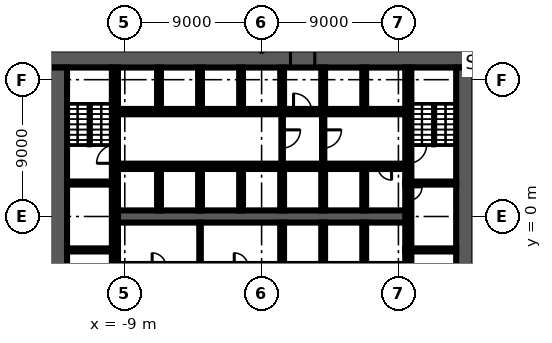
"""IFC4 building model, lengths in metres.
Left out: names, types, materials, properties, quantities, classifications, styles, units other than length and angle.
Written with IfcOpenShell. Run it as: python <this file> out.ifc"""

import sys

from ifc_helpers import new_model, si_unit, direction, frame, frame_2d, origin, place, context, subcontext, project, spatial, rectangle, extrude, element, fill, save


model = new_model("IFC4")
c1 = context("Model", 3, precision=1e-05, world=origin(), true_north=direction((0.0, 1.0)))
c2 = subcontext(c1, "Body", "Model", "MODEL_VIEW")
j1 = project(units=[si_unit("LENGTHUNIT", "METRE"), si_unit("PLANEANGLEUNIT", "RADIAN")], contexts=[c1])
p1 = place(None, origin())
s1 = spatial("IfcSite", under=j1, at=p1, CompositionType="ELEMENT")
p2 = place(p1, origin())
s2 = spatial("IfcBuilding", under=s1, at=p2, CompositionType="ELEMENT")
p3 = place(p2, frame((0.0, 0.0, -6.0)))
s3 = spatial("IfcBuildingStorey", under=s2, at=p3, CompositionType="ELEMENT", Elevation=-6.0)
p4 = place(p3, frame((-14.0, 10.4, 0.0), z_axis=(0.0, 0.0, 1.0), x_axis=(1.0, 0.0, 0.0)))
e1 = element("IfcWall", 1, at=p4, inside=s3, PredefinedType="SHEAR", context=c2, shape_type="SweptSolid", body=[
    extrude(rectangle(XDim=28.0, YDim=1.2, at=frame_2d((14.0, 0.0))), origin(), (0.0, 0.0, 1.0), 5.55),
])
p5 = place(p4, frame((15.9, 0.0, 0.0)))
e2 = element("IfcOpeningElement", 2, at=p5, cuts=e1, PredefinedType="OPENING", context=c2, shape_type="SweptSolid", body=[
    extrude(rectangle(XDim=1.6, YDim=2.1, at=frame_2d((0.8, 1.05))), frame((0.0, 0.61, 0.0), z_axis=(0.0, -1.0, 0.0), x_axis=(1.0, 0.0, 0.0)), (0.0, 0.0, 1.0), 1.22),
])
for number, where, z_axis, x_axis in (
    (3, (13.4, 9.8, 0.0), (0.0, 0.0, 1.0), (0.0, -1.0, 0.0)),
    (4, (-13.4, -9.8, 0.0), (0.0, 0.0, 1.0), (0.0, 1.0, 0.0)),
):
    element("IfcWall", number, at=place(p3, frame(where, z_axis=z_axis, x_axis=x_axis)), inside=s3, PredefinedType="SHEAR", context=c2, shape_type="SweptSolid", body=[
        extrude(rectangle(XDim=19.6, YDim=1.2, at=frame_2d((9.8, 0.0))), origin(), (0.0, 0.0, 1.0), 5.55),
    ])
p6 = place(p3, frame((9.65, -2.3, 0.0), z_axis=(0.0, 0.0, 1.0), x_axis=(0.0, -1.0, 0.0)))
e5 = element("IfcWall", 5, at=p6, inside=s3, PredefinedType="SHEAR", context=c2, shape_type="SweptSolid", body=[
    extrude(rectangle(XDim=7.5, YDim=0.4, at=frame_2d((3.75, 0.0))), origin(), (0.0, 0.0, 1.0), 5.55),
])
p7 = place(p6, frame((1.2, 0.0, 0.0)))
e6 = element("IfcOpeningElement", 6, at=p7, cuts=e5, PredefinedType="OPENING", context=c2, shape_type="SweptSolid", body=[
    extrude(rectangle(XDim=1.2, YDim=2.1, at=frame_2d((0.6, 1.05))), frame((0.0, 0.21, 0.0), z_axis=(0.0, -1.0, 0.0), x_axis=(1.0, 0.0, 0.0)), (0.0, 0.0, 1.0), 0.42),
])
p8 = place(p3, frame((9.65, 2.1, 0.0), z_axis=(0.0, 0.0, 1.0), x_axis=(0.0, -1.0, 0.0)))
e7 = element("IfcWall", 7, at=p8, inside=s3, PredefinedType="SHEAR", context=c2, shape_type="SweptSolid", body=[
    extrude(rectangle(XDim=4.2, YDim=0.4, at=frame_2d((2.1, 0.0))), origin(), (0.0, 0.0, 1.0), 5.55),
])
p9 = place(p8, frame((0.15, 0.0, 0.0)))
e8 = element("IfcOpeningElement", 8, at=p9, cuts=e7, PredefinedType="OPENING", context=c2, shape_type="SweptSolid", body=[
    extrude(rectangle(XDim=0.9, YDim=2.1, at=frame_2d((0.45, 1.05))), frame((0.0, 0.21, 0.0), z_axis=(0.0, -1.0, 0.0), x_axis=(1.0, 0.0, 0.0)), (0.0, 0.0, 1.0), 0.42),
])
p10 = place(p3, frame((9.65, 9.8, 0.0), z_axis=(0.0, 0.0, 1.0), x_axis=(0.0, -1.0, 0.0)))
e9 = element("IfcWall", 9, at=p10, inside=s3, PredefinedType="SHEAR", context=c2, shape_type="SweptSolid", body=[
    extrude(rectangle(XDim=7.5, YDim=0.4, at=frame_2d((3.75, 0.0))), origin(), (0.0, 0.0, 1.0), 5.55),
])
p11 = place(p10, frame((5.1, 0.0, 0.0)))
e10 = element("IfcOpeningElement", 10, at=p11, cuts=e9, PredefinedType="OPENING", context=c2, shape_type="SweptSolid", body=[
    extrude(rectangle(XDim=1.2, YDim=2.1, at=frame_2d((0.6, 1.05))), frame((0.0, 0.21, 0.0), z_axis=(0.0, -1.0, 0.0), x_axis=(1.0, 0.0, 0.0)), (0.0, 0.0, 1.0), 0.42),
])
p12 = place(p3, frame((-9.65, -9.8, 0.0), z_axis=(0.0, 0.0, 1.0), x_axis=(0.0, 1.0, 0.0)))
e11 = element("IfcWall", 11, at=p12, inside=s3, PredefinedType="SHEAR", context=c2, shape_type="SweptSolid", body=[
    extrude(rectangle(XDim=7.5, YDim=0.4, at=frame_2d((3.75, 0.0))), origin(), (0.0, 0.0, 1.0), 5.55),
])
p13 = place(p12, frame((5.1, 0.0, 0.0)))
e12 = element("IfcOpeningElement", 12, at=p13, cuts=e11, PredefinedType="OPENING", context=c2, shape_type="SweptSolid", body=[
    extrude(rectangle(XDim=1.2, YDim=2.1, at=frame_2d((0.6, 1.05))), frame((0.0, 0.21, 0.0), z_axis=(0.0, -1.0, 0.0), x_axis=(1.0, 0.0, 0.0)), (0.0, 0.0, 1.0), 0.42),
])
p14 = place(p3, frame((-9.65, -2.1, 0.0), z_axis=(0.0, 0.0, 1.0), x_axis=(0.0, 1.0, 0.0)))
e13 = element("IfcWall", 13, at=p14, inside=s3, PredefinedType="SHEAR", context=c2, shape_type="SweptSolid", body=[
    extrude(rectangle(XDim=4.2, YDim=0.4, at=frame_2d((2.1, 0.0))), origin(), (0.0, 0.0, 1.0), 5.55),
])
p15 = place(p3, frame((-9.65, 2.3, 0.0), z_axis=(0.0, 0.0, 1.0), x_axis=(0.0, 1.0, 0.0)))
e14 = element("IfcWall", 14, at=p15, inside=s3, PredefinedType="SHEAR", context=c2, shape_type="SweptSolid", body=[
    extrude(rectangle(XDim=7.5, YDim=0.4, at=frame_2d((3.75, 0.0))), origin(), (0.0, 0.0, 1.0), 5.55),
])
p16 = place(p15, frame((1.2, 0.0, 0.0)))
e15 = element("IfcOpeningElement", 15, at=p16, cuts=e14, PredefinedType="OPENING", context=c2, shape_type="SweptSolid", body=[
    extrude(rectangle(XDim=1.2, YDim=2.1, at=frame_2d((0.6, 1.05))), frame((0.0, 0.21, 0.0), z_axis=(0.0, -1.0, 0.0), x_axis=(1.0, 0.0, 0.0)), (0.0, 0.0, 1.0), 0.42),
])
for number, where, z_axis, x_axis in (
    (16, (9.45, 2.2, 0.0), (0.0, 0.0, 1.0), (1.0, 0.0, 0.0)),
    (17, (-9.45, 2.2, 0.0), (0.0, 0.0, 1.0), (-1.0, 0.0, 0.0)),
    (18, (9.45, -2.2, 0.0), (0.0, 0.0, 1.0), (1.0, 0.0, 0.0)),
    (19, (-9.45, -2.2, 0.0), (0.0, 0.0, 1.0), (-1.0, 0.0, 0.0)),
):
    element("IfcWall", number, at=place(p3, frame(where, z_axis=z_axis, x_axis=x_axis)), inside=s3, PredefinedType="SHEAR", context=c2, shape_type="SweptSolid", body=[
        extrude(rectangle(XDim=3.35, YDim=0.2, at=frame_2d((1.675, 0.0))), origin(), (0.0, 0.0, 1.0), 5.55),
    ])
p17 = place(p3, frame((-9.45, 6.9, 0.0), z_axis=(0.0, 0.0, 1.0), x_axis=(1.0, 0.0, 0.0)))
e20 = element("IfcWall", 20, at=p17, inside=s3, PredefinedType="SHEAR", context=c2, shape_type="SweptSolid", body=[
    extrude(rectangle(XDim=18.9, YDim=0.35, at=frame_2d((9.45, 0.0))), origin(), (0.0, 0.0, 1.0), 5.55),
])
p18 = place(p17, frame((0.8, 0.0, 0.0)))
e21 = element("IfcOpeningElement", 21, at=p18, cuts=e20, PredefinedType="OPENING", context=c2, shape_type="SweptSolid", body=[
    extrude(rectangle(XDim=1.1, YDim=2.1, at=frame_2d((0.55, 1.05))), frame((0.0, 0.185, 0.0), z_axis=(0.0, -1.0, 0.0), x_axis=(1.0, 0.0, 0.0)), (0.0, 0.0, 1.0), 0.37),
])
p19 = place(p17, frame((3.5, 0.0, 0.0)))
e22 = element("IfcOpeningElement", 22, at=p19, cuts=e20, PredefinedType="OPENING", context=c2, shape_type="SweptSolid", body=[
    extrude(rectangle(XDim=1.1, YDim=2.1, at=frame_2d((0.55, 1.05))), frame((0.0, 0.185, 0.0), z_axis=(0.0, -1.0, 0.0), x_axis=(1.0, 0.0, 0.0)), (0.0, 0.0, 1.0), 0.37),
])
p20 = place(p17, frame((6.2, 0.0, 0.0)))
e23 = element("IfcOpeningElement", 23, at=p20, cuts=e20, PredefinedType="OPENING", context=c2, shape_type="SweptSolid", body=[
    extrude(rectangle(XDim=1.1, YDim=2.1, at=frame_2d((0.55, 1.05))), frame((0.0, 0.185, 0.0), z_axis=(0.0, -1.0, 0.0), x_axis=(1.0, 0.0, 0.0)), (0.0, 0.0, 1.0), 0.37),
])
p21 = place(p17, frame((8.9, 0.0, 0.0)))
e24 = element("IfcOpeningElement", 24, at=p21, cuts=e20, PredefinedType="OPENING", context=c2, shape_type="SweptSolid", body=[
    extrude(rectangle(XDim=1.1, YDim=2.1, at=frame_2d((0.55, 1.05))), frame((0.0, 0.185, 0.0), z_axis=(0.0, -1.0, 0.0), x_axis=(1.0, 0.0, 0.0)), (0.0, 0.0, 1.0), 0.37),
])
p22 = place(p17, frame((11.55, 0.0, 0.0)))
e25 = element("IfcOpeningElement", 25, at=p22, cuts=e20, PredefinedType="OPENING", context=c2, shape_type="SweptSolid", body=[
    extrude(rectangle(XDim=1.2, YDim=2.1, at=frame_2d((0.6, 1.05))), frame((0.0, 0.185, 0.0), z_axis=(0.0, -1.0, 0.0), x_axis=(1.0, 0.0, 0.0)), (0.0, 0.0, 1.0), 0.37),
])
p23 = place(p17, frame((14.3, 0.0, 0.0)))
e26 = element("IfcOpeningElement", 26, at=p23, cuts=e20, PredefinedType="OPENING", context=c2, shape_type="SweptSolid", body=[
    extrude(rectangle(XDim=1.1, YDim=2.1, at=frame_2d((0.55, 1.05))), frame((0.0, 0.185, 0.0), z_axis=(0.0, -1.0, 0.0), x_axis=(1.0, 0.0, 0.0)), (0.0, 0.0, 1.0), 0.37),
])
p24 = place(p17, frame((17.0, 0.0, 0.0)))
e27 = element("IfcOpeningElement", 27, at=p24, cuts=e20, PredefinedType="OPENING", context=c2, shape_type="SweptSolid", body=[
    extrude(rectangle(XDim=1.1, YDim=2.1, at=frame_2d((0.55, 1.05))), frame((0.0, 0.185, 0.0), z_axis=(0.0, -1.0, 0.0), x_axis=(1.0, 0.0, 0.0)), (0.0, 0.0, 1.0), 0.37),
])
p25 = place(p3, frame((9.45, 3.3, 0.0), z_axis=(0.0, 0.0, 1.0), x_axis=(-1.0, 0.0, 0.0)))
e28 = element("IfcWall", 28, at=p25, inside=s3, PredefinedType="SHEAR", context=c2, shape_type="SweptSolid", body=[
    extrude(rectangle(XDim=18.9, YDim=0.35, at=frame_2d((9.45, 0.0))), origin(), (0.0, 0.0, 1.0), 5.55),
])
p26 = place(p25, frame((17.0, 0.0, 0.0)))
e29 = element("IfcOpeningElement", 29, at=p26, cuts=e28, PredefinedType="OPENING", context=c2, shape_type="SweptSolid", body=[
    extrude(rectangle(XDim=1.1, YDim=2.1, at=frame_2d((0.55, 1.05))), frame((0.0, 0.185, 0.0), z_axis=(0.0, -1.0, 0.0), x_axis=(1.0, 0.0, 0.0)), (0.0, 0.0, 1.0), 0.37),
])
p27 = place(p25, frame((14.3, 0.0, 0.0)))
e30 = element("IfcOpeningElement", 30, at=p27, cuts=e28, PredefinedType="OPENING", context=c2, shape_type="SweptSolid", body=[
    extrude(rectangle(XDim=1.1, YDim=2.1, at=frame_2d((0.55, 1.05))), frame((0.0, 0.185, 0.0), z_axis=(0.0, -1.0, 0.0), x_axis=(1.0, 0.0, 0.0)), (0.0, 0.0, 1.0), 0.37),
])
p28 = place(p25, frame((11.6, 0.0, 0.0)))
e31 = element("IfcOpeningElement", 31, at=p28, cuts=e28, PredefinedType="OPENING", context=c2, shape_type="SweptSolid", body=[
    extrude(rectangle(XDim=1.1, YDim=2.1, at=frame_2d((0.55, 1.05))), frame((0.0, 0.185, 0.0), z_axis=(0.0, -1.0, 0.0), x_axis=(1.0, 0.0, 0.0)), (0.0, 0.0, 1.0), 0.37),
])
p29 = place(p25, frame((8.9, 0.0, 0.0)))
e32 = element("IfcOpeningElement", 32, at=p29, cuts=e28, PredefinedType="OPENING", context=c2, shape_type="SweptSolid", body=[
    extrude(rectangle(XDim=1.1, YDim=2.1, at=frame_2d((0.55, 1.05))), frame((0.0, 0.185, 0.0), z_axis=(0.0, -1.0, 0.0), x_axis=(1.0, 0.0, 0.0)), (0.0, 0.0, 1.0), 0.37),
])
p30 = place(p25, frame((6.2, 0.0, 0.0)))
e33 = element("IfcOpeningElement", 33, at=p30, cuts=e28, PredefinedType="OPENING", context=c2, shape_type="SweptSolid", body=[
    extrude(rectangle(XDim=1.1, YDim=2.1, at=frame_2d((0.55, 1.05))), frame((0.0, 0.185, 0.0), z_axis=(0.0, -1.0, 0.0), x_axis=(1.0, 0.0, 0.0)), (0.0, 0.0, 1.0), 0.37),
])
p31 = place(p25, frame((3.5, 0.0, 0.0)))
e34 = element("IfcOpeningElement", 34, at=p31, cuts=e28, PredefinedType="OPENING", context=c2, shape_type="SweptSolid", body=[
    extrude(rectangle(XDim=1.1, YDim=2.1, at=frame_2d((0.55, 1.05))), frame((0.0, 0.185, 0.0), z_axis=(0.0, -1.0, 0.0), x_axis=(1.0, 0.0, 0.0)), (0.0, 0.0, 1.0), 0.37),
])
p32 = place(p25, frame((0.9, 0.0, 0.0)))
e35 = element("IfcOpeningElement", 35, at=p32, cuts=e28, PredefinedType="OPENING", context=c2, shape_type="SweptSolid", body=[
    extrude(rectangle(XDim=0.9, YDim=2.1, at=frame_2d((0.45, 1.05))), frame((0.0, 0.185, 0.0), z_axis=(0.0, -1.0, 0.0), x_axis=(1.0, 0.0, 0.0)), (0.0, 0.0, 1.0), 0.37),
])
p33 = place(p3, frame((-9.45, 0.0, 0.0), z_axis=(0.0, 0.0, 1.0), x_axis=(1.0, 0.0, 0.0)))
e36 = element("IfcWall", 36, at=p33, inside=s3, PredefinedType="SHEAR", context=c2, shape_type="SweptSolid", body=[
    extrude(rectangle(XDim=18.9, YDim=0.8, at=frame_2d((9.45, 0.0))), origin(), (0.0, 0.0, 1.0), 5.55),
])
for number, where, z_axis, x_axis in (
    (37, (6.75, -3.125, 0.0), (0.0, 0.0, 1.0), (0.0, 1.0, 0.0)),
    (38, (6.75, 0.4, 0.0), (0.0, 0.0, 1.0), (0.0, 1.0, 0.0)),
    (39, (6.75, 7.075, 0.0), (0.0, 0.0, 1.0), (0.0, 1.0, 0.0)),
):
    element("IfcWall", number, at=place(p3, frame(where, z_axis=z_axis, x_axis=x_axis)), inside=s3, PredefinedType="SOLIDWALL", context=c2, shape_type="SweptSolid", body=[
        extrude(rectangle(XDim=2.725, YDim=0.25, at=frame_2d((1.363, 0.0))), origin(), (0.0, 0.0, 1.0), 5.55),
    ])
p34 = place(p3, frame((4.05, 6.725, 0.0), z_axis=(0.0, 0.0, 1.0), x_axis=(0.0, -1.0, 0.0)))
e40 = element("IfcWall", 40, at=p34, inside=s3, PredefinedType="PARTITIONING", context=c2, shape_type="SweptSolid", body=[
    extrude(rectangle(XDim=3.25, YDim=0.15, at=frame_2d((1.625, 0.0))), origin(), (0.0, 0.0, 1.0), 5.55),
])
p35 = place(p34, frame((1.025, 0.0, 0.0)))
e41 = element("IfcOpeningElement", 41, at=p35, cuts=e40, PredefinedType="OPENING", context=c2, shape_type="SweptSolid", body=[
    extrude(rectangle(XDim=1.2, YDim=2.1, at=frame_2d((0.6, 1.05))), frame((0.0, 0.085, 0.0), z_axis=(0.0, -1.0, 0.0), x_axis=(1.0, 0.0, 0.0)), (0.0, 0.0, 1.0), 0.17),
])
for number, where, z_axis, x_axis in (
    (42, (4.05, -3.125, 0.0), (0.0, 0.0, 1.0), (0.0, 1.0, 0.0)),
    (43, (4.05, 0.4, 0.0), (0.0, 0.0, 1.0), (0.0, 1.0, 0.0)),
    (44, (4.05, 7.075, 0.0), (0.0, 0.0, 1.0), (0.0, 1.0, 0.0)),
):
    element("IfcWall", number, at=place(p3, frame(where, z_axis=z_axis, x_axis=x_axis)), inside=s3, PredefinedType="SOLIDWALL", context=c2, shape_type="SweptSolid", body=[
        extrude(rectangle(XDim=2.725, YDim=0.25, at=frame_2d((1.363, 0.0))), origin(), (0.0, 0.0, 1.0), 5.55),
    ])
p36 = place(p3, frame((1.35, 6.725, 0.0), z_axis=(0.0, 0.0, 1.0), x_axis=(0.0, -1.0, 0.0)))
e45 = element("IfcWall", 45, at=p36, inside=s3, PredefinedType="PARTITIONING", context=c2, shape_type="SweptSolid", body=[
    extrude(rectangle(XDim=3.25, YDim=0.1, at=frame_2d((1.625, 0.0))), origin(), (0.0, 0.0, 1.0), 5.55),
])
p37 = place(p36, frame((1.025, 0.0, 0.0)))
e46 = element("IfcOpeningElement", 46, at=p37, cuts=e45, PredefinedType="OPENING", context=c2, shape_type="SweptSolid", body=[
    extrude(rectangle(XDim=1.2, YDim=2.1, at=frame_2d((0.6, 1.05))), frame((0.0, 0.06, 0.0), z_axis=(0.0, -1.0, 0.0), x_axis=(1.0, 0.0, 0.0)), (0.0, 0.0, 1.0), 0.12),
])
for number, where, z_axis, x_axis in (
    (47, (1.35, -3.125, 0.0), (0.0, 0.0, 1.0), (0.0, 1.0, 0.0)),
    (48, (1.35, 0.4, 0.0), (0.0, 0.0, 1.0), (0.0, 1.0, 0.0)),
    (49, (1.35, 7.075, 0.0), (0.0, 0.0, 1.0), (0.0, 1.0, 0.0)),
    (50, (-1.35, 0.4, 0.0), (0.0, 0.0, 1.0), (0.0, 1.0, 0.0)),
    (51, (-1.35, 7.075, 0.0), (0.0, 0.0, 1.0), (0.0, 1.0, 0.0)),
):
    element("IfcWall", number, at=place(p3, frame(where, z_axis=z_axis, x_axis=x_axis)), inside=s3, PredefinedType="SOLIDWALL", context=c2, shape_type="SweptSolid", body=[
        extrude(rectangle(XDim=2.725, YDim=0.25, at=frame_2d((1.363, 0.0))), origin(), (0.0, 0.0, 1.0), 5.55),
    ])
p38 = place(p3, frame((-4.05, -3.125, 0.0), z_axis=(0.0, 0.0, 1.0), x_axis=(0.0, 1.0, 0.0)))
e52 = element("IfcWall", 52, at=p38, inside=s3, PredefinedType="PARTITIONING", context=c2, shape_type="SweptSolid", body=[
    extrude(rectangle(XDim=2.725, YDim=0.1, at=frame_2d((1.363, 0.0))), origin(), (0.0, 0.0, 1.0), 5.55),
])
for number, where, z_axis, x_axis in (
    (53, (-4.05, 0.4, 0.0), (0.0, 0.0, 1.0), (0.0, 1.0, 0.0)),
    (54, (-4.05, 7.075, 0.0), (0.0, 0.0, 1.0), (0.0, 1.0, 0.0)),
    (55, (-6.75, 0.4, 0.0), (0.0, 0.0, 1.0), (0.0, 1.0, 0.0)),
    (56, (-6.75, 7.075, 0.0), (0.0, 0.0, 1.0), (0.0, 1.0, 0.0)),
):
    element("IfcWall", number, at=place(p3, frame(where, z_axis=z_axis, x_axis=x_axis)), inside=s3, PredefinedType="SOLIDWALL", context=c2, shape_type="SweptSolid", body=[
        extrude(rectangle(XDim=2.725, YDim=0.25, at=frame_2d((1.363, 0.0))), origin(), (0.0, 0.0, 1.0), 5.55),
    ])
p39 = place(p9, origin())
e57 = element("IfcDoor", 57, at=p39, inside=s3, OperationType="SINGLE_SWING_RIGHT", PredefinedType="DOOR", context=c2, shape_type="SweptSolid", body=[
    extrude(rectangle(XDim=0.9, YDim=2.1, at=frame_2d((0.45, 1.05))), frame((0.0, 0.025, 0.0), z_axis=(0.0, -1.0, 0.0), x_axis=(1.0, 0.0, 0.0)), (0.0, 0.0, 1.0), 0.05),
])
fill(e8, e57)
p40 = place(p18, origin())
e58 = element("IfcDoor", 58, at=p40, inside=s3, OperationType="DOUBLE_DOOR_SLIDING", PredefinedType="DOOR", context=c2, shape_type="SweptSolid", body=[
    extrude(rectangle(XDim=1.1, YDim=2.1, at=frame_2d((0.55, 1.05))), frame((0.0, 0.025, 0.0), z_axis=(0.0, -1.0, 0.0), x_axis=(1.0, 0.0, 0.0)), (0.0, 0.0, 1.0), 0.05),
])
fill(e21, e58)
p41 = place(p19, origin())
e59 = element("IfcDoor", 59, at=p41, inside=s3, OperationType="DOUBLE_DOOR_SLIDING", PredefinedType="DOOR", context=c2, shape_type="SweptSolid", body=[
    extrude(rectangle(XDim=1.1, YDim=2.1, at=frame_2d((0.55, 1.05))), frame((0.0, 0.025, 0.0), z_axis=(0.0, -1.0, 0.0), x_axis=(1.0, 0.0, 0.0)), (0.0, 0.0, 1.0), 0.05),
])
fill(e22, e59)
p42 = place(p20, origin())
e60 = element("IfcDoor", 60, at=p42, inside=s3, OperationType="DOUBLE_DOOR_SLIDING", PredefinedType="DOOR", context=c2, shape_type="SweptSolid", body=[
    extrude(rectangle(XDim=1.1, YDim=2.1, at=frame_2d((0.55, 1.05))), frame((0.0, 0.025, 0.0), z_axis=(0.0, -1.0, 0.0), x_axis=(1.0, 0.0, 0.0)), (0.0, 0.0, 1.0), 0.05),
])
fill(e23, e60)
p43 = place(p21, origin())
e61 = element("IfcDoor", 61, at=p43, inside=s3, OperationType="DOUBLE_DOOR_SLIDING", PredefinedType="DOOR", context=c2, shape_type="SweptSolid", body=[
    extrude(rectangle(XDim=1.1, YDim=2.1, at=frame_2d((0.55, 1.05))), frame((0.0, 0.025, 0.0), z_axis=(0.0, -1.0, 0.0), x_axis=(1.0, 0.0, 0.0)), (0.0, 0.0, 1.0), 0.05),
])
fill(e24, e61)
p44 = place(p5, origin())
e62 = element("IfcDoor", 62, at=p44, inside=s3, OperationType="DOUBLE_DOOR_SINGLE_SWING", PredefinedType="DOOR", context=c2, shape_type="SweptSolid", body=[
    extrude(rectangle(XDim=1.6, YDim=2.1, at=frame_2d((0.8, 1.05))), frame((0.0, 0.025, 0.0), z_axis=(0.0, -1.0, 0.0), x_axis=(1.0, 0.0, 0.0)), (0.0, 0.0, 1.0), 0.05),
])
fill(e2, e62)
p45 = place(p22, origin())
e63 = element("IfcDoor", 63, at=p45, inside=s3, OperationType="SINGLE_SWING_LEFT", PredefinedType="DOOR", context=c2, shape_type="SweptSolid", body=[
    extrude(rectangle(XDim=1.2, YDim=2.1, at=frame_2d((0.6, 1.05))), frame((0.0, 0.025, 0.0), z_axis=(0.0, -1.0, 0.0), x_axis=(1.0, 0.0, 0.0)), (0.0, 0.0, 1.0), 0.05),
])
fill(e25, e63)
p46 = place(p23, origin())
e64 = element("IfcDoor", 64, at=p46, inside=s3, OperationType="DOUBLE_DOOR_SLIDING", PredefinedType="DOOR", context=c2, shape_type="SweptSolid", body=[
    extrude(rectangle(XDim=1.1, YDim=2.1, at=frame_2d((0.55, 1.05))), frame((0.0, 0.025, 0.0), z_axis=(0.0, -1.0, 0.0), x_axis=(1.0, 0.0, 0.0)), (0.0, 0.0, 1.0), 0.05),
])
fill(e26, e64)
p47 = place(p24, origin())
e65 = element("IfcDoor", 65, at=p47, inside=s3, OperationType="DOUBLE_DOOR_SLIDING", PredefinedType="DOOR", context=c2, shape_type="SweptSolid", body=[
    extrude(rectangle(XDim=1.1, YDim=2.1, at=frame_2d((0.55, 1.05))), frame((0.0, 0.025, 0.0), z_axis=(0.0, -1.0, 0.0), x_axis=(1.0, 0.0, 0.0)), (0.0, 0.0, 1.0), 0.05),
])
fill(e27, e65)
p48 = place(p26, origin())
e66 = element("IfcDoor", 66, at=p48, inside=s3, OperationType="DOUBLE_DOOR_SLIDING", PredefinedType="DOOR", context=c2, shape_type="SweptSolid", body=[
    extrude(rectangle(XDim=1.1, YDim=2.1, at=frame_2d((0.55, 1.05))), frame((0.0, 0.025, 0.0), z_axis=(0.0, -1.0, 0.0), x_axis=(1.0, 0.0, 0.0)), (0.0, 0.0, 1.0), 0.05),
])
fill(e29, e66)
p49 = place(p27, origin())
e67 = element("IfcDoor", 67, at=p49, inside=s3, OperationType="DOUBLE_DOOR_SLIDING", PredefinedType="DOOR", context=c2, shape_type="SweptSolid", body=[
    extrude(rectangle(XDim=1.1, YDim=2.1, at=frame_2d((0.55, 1.05))), frame((0.0, 0.025, 0.0), z_axis=(0.0, -1.0, 0.0), x_axis=(1.0, 0.0, 0.0)), (0.0, 0.0, 1.0), 0.05),
])
fill(e30, e67)
p50 = place(p28, origin())
e68 = element("IfcDoor", 68, at=p50, inside=s3, OperationType="DOUBLE_DOOR_SLIDING", PredefinedType="DOOR", context=c2, shape_type="SweptSolid", body=[
    extrude(rectangle(XDim=1.1, YDim=2.1, at=frame_2d((0.55, 1.05))), frame((0.0, 0.025, 0.0), z_axis=(0.0, -1.0, 0.0), x_axis=(1.0, 0.0, 0.0)), (0.0, 0.0, 1.0), 0.05),
])
fill(e31, e68)
p51 = place(p29, origin())
e69 = element("IfcDoor", 69, at=p51, inside=s3, OperationType="DOUBLE_DOOR_SLIDING", PredefinedType="DOOR", context=c2, shape_type="SweptSolid", body=[
    extrude(rectangle(XDim=1.1, YDim=2.1, at=frame_2d((0.55, 1.05))), frame((0.0, 0.025, 0.0), z_axis=(0.0, -1.0, 0.0), x_axis=(1.0, 0.0, 0.0)), (0.0, 0.0, 1.0), 0.05),
])
fill(e32, e69)
p52 = place(p30, origin())
e70 = element("IfcDoor", 70, at=p52, inside=s3, OperationType="DOUBLE_DOOR_SLIDING", PredefinedType="DOOR", context=c2, shape_type="SweptSolid", body=[
    extrude(rectangle(XDim=1.1, YDim=2.1, at=frame_2d((0.55, 1.05))), frame((0.0, 0.025, 0.0), z_axis=(0.0, -1.0, 0.0), x_axis=(1.0, 0.0, 0.0)), (0.0, 0.0, 1.0), 0.05),
])
fill(e33, e70)
p53 = place(p31, origin())
e71 = element("IfcDoor", 71, at=p53, inside=s3, OperationType="DOUBLE_DOOR_SLIDING", PredefinedType="DOOR", context=c2, shape_type="SweptSolid", body=[
    extrude(rectangle(XDim=1.1, YDim=2.1, at=frame_2d((0.55, 1.05))), frame((0.0, 0.025, 0.0), z_axis=(0.0, -1.0, 0.0), x_axis=(1.0, 0.0, 0.0)), (0.0, 0.0, 1.0), 0.05),
])
fill(e34, e71)
p54 = place(p32, origin())
e72 = element("IfcDoor", 72, at=p54, inside=s3, OperationType="SINGLE_SWING_LEFT", PredefinedType="DOOR", context=c2, shape_type="SweptSolid", body=[
    extrude(rectangle(XDim=0.9, YDim=2.1, at=frame_2d((0.45, 1.05))), frame((0.0, 0.025, 0.0), z_axis=(0.0, -1.0, 0.0), x_axis=(1.0, 0.0, 0.0)), (0.0, 0.0, 1.0), 0.05),
])
fill(e35, e72)
p55 = place(p11, origin())
e73 = element("IfcDoor", 73, at=p55, inside=s3, OperationType="SINGLE_SWING_LEFT", PredefinedType="DOOR", context=c2, shape_type="SweptSolid", body=[
    extrude(rectangle(XDim=1.2, YDim=2.1, at=frame_2d((0.6, 1.05))), frame((0.0, 0.025, 0.0), z_axis=(0.0, -1.0, 0.0), x_axis=(1.0, 0.0, 0.0)), (0.0, 0.0, 1.0), 0.05),
])
fill(e10, e73)
p56 = place(p16, origin())
e74 = element("IfcDoor", 74, at=p56, inside=s3, OperationType="SINGLE_SWING_RIGHT", PredefinedType="DOOR", context=c2, shape_type="SweptSolid", body=[
    extrude(rectangle(XDim=1.2, YDim=2.1, at=frame_2d((0.6, 1.05))), frame((0.0, 0.025, 0.0), z_axis=(0.0, -1.0, 0.0), x_axis=(1.0, 0.0, 0.0)), (0.0, 0.0, 1.0), 0.05),
])
fill(e15, e74)
p57 = place(p37, origin())
e75 = element("IfcDoor", 75, at=p57, inside=s3, OperationType="SINGLE_SWING_LEFT", PredefinedType="DOOR", context=c2, shape_type="SweptSolid", body=[
    extrude(rectangle(XDim=1.2, YDim=2.1, at=frame_2d((0.6, 1.05))), frame((0.0, 0.025, 0.0), z_axis=(0.0, -1.0, 0.0), x_axis=(1.0, 0.0, 0.0)), (0.0, 0.0, 1.0), 0.05),
])
fill(e46, e75)
p58 = place(p35, origin())
e76 = element("IfcDoor", 76, at=p58, inside=s3, OperationType="SINGLE_SWING_RIGHT", PredefinedType="DOOR", context=c2, shape_type="SweptSolid", body=[
    extrude(rectangle(XDim=1.2, YDim=2.1, at=frame_2d((0.6, 1.05))), frame((0.0, 0.025, 0.0), z_axis=(0.0, -1.0, 0.0), x_axis=(1.0, 0.0, 0.0)), (0.0, 0.0, 1.0), 0.05),
])
fill(e41, e76)
save(model, sys.argv[1])
